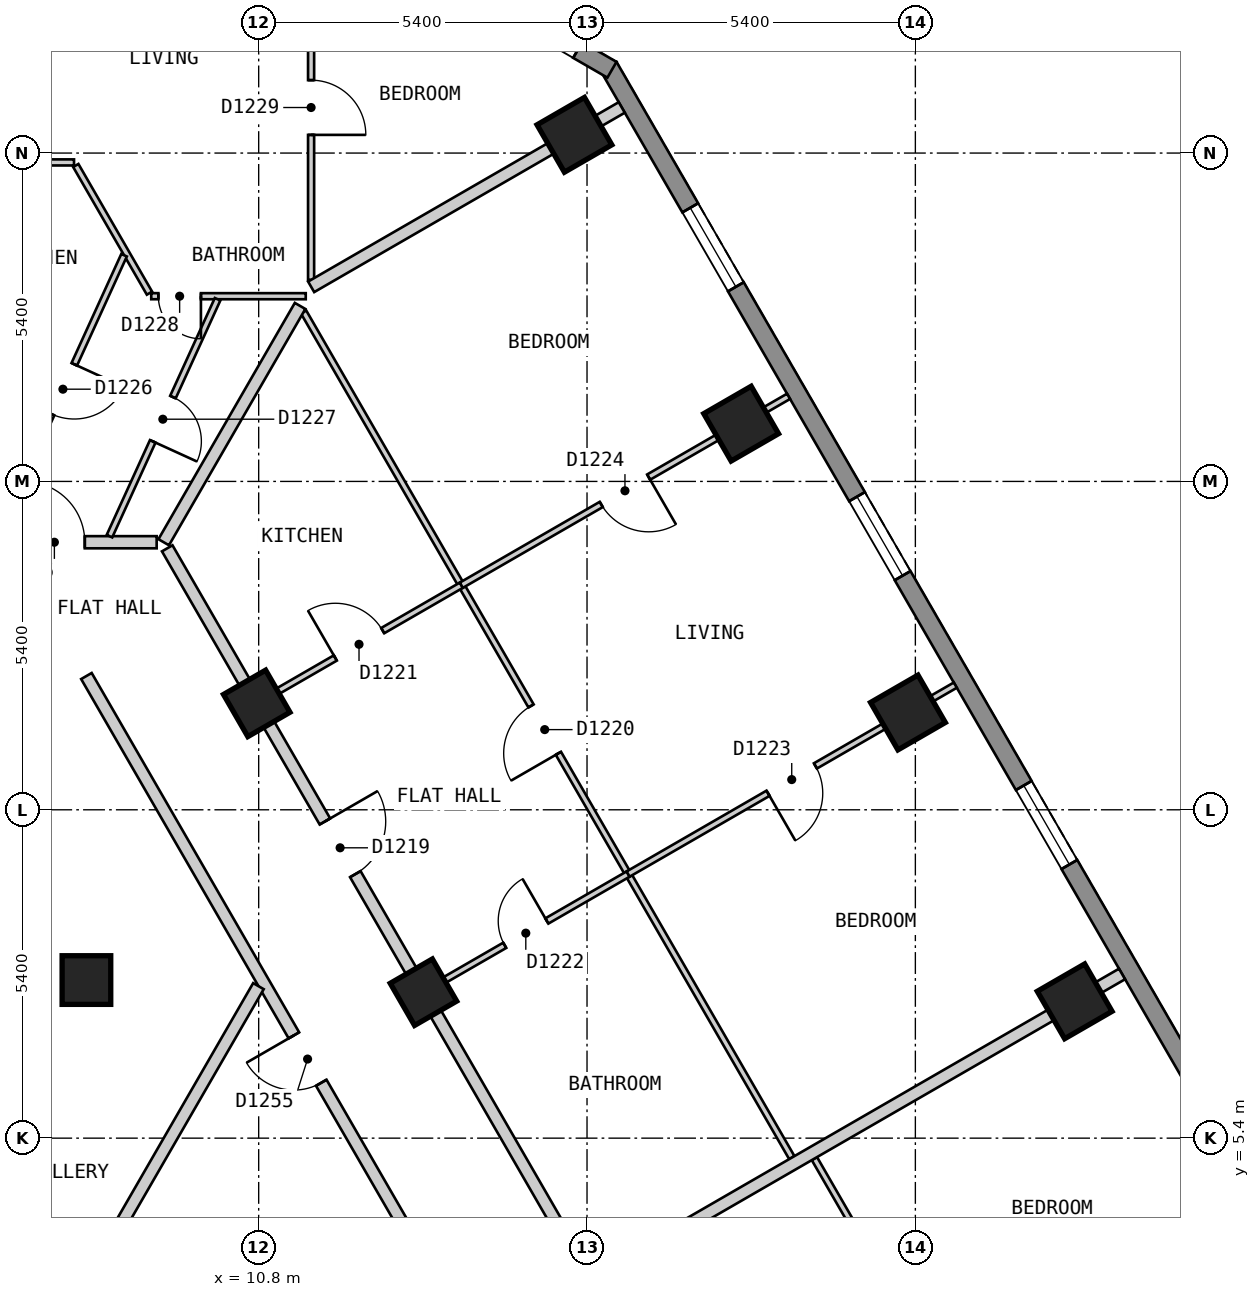
"""IFC4 building model, lengths in metres.
Left out: names, types, materials, properties, quantities, classifications, styles, units other than length and angle.
Written with IfcOpenShell. Run it as: python <this file> out.ifc"""

import sys

from ifc_helpers import new_model, si_unit, direction, frame, frame_2d, origin, origin_2d, place, context, subcontext, project, spatial, polyline, rectangle, outline, extrude, element, fill, save


model = new_model("IFC4")
c1 = context("Model", 3, precision=1e-05, world=origin(), true_north=direction((0.0, 1.0)))
c2 = subcontext(c1, "Body", "Model", "MODEL_VIEW")
j1 = project(units=[si_unit("LENGTHUNIT", "METRE"), si_unit("PLANEANGLEUNIT", "RADIAN")], contexts=[c1])
p1 = place(None, origin())
s1 = spatial("IfcSite", under=j1, at=p1, CompositionType="ELEMENT")
p2 = place(p1, origin())
s2 = spatial("IfcBuilding", under=s1, at=p2, CompositionType="ELEMENT")
p3 = place(p2, frame((0.0, 0.0, 129.6)))
s3 = spatial("IfcBuildingStorey", under=s2, at=p3, CompositionType="ELEMENT", Elevation=129.6)
for number, where, z_axis, x_axis in (
    (1, (24.22, 7.65, 0.0), (0.0, 0.0, 1.0), (-0.5, 0.866, 0.0)),
    (2, (21.478, 12.4, 0.0), (0.0, 0.0, 1.0), (-0.5, 0.866, 0.0)),
    (3, (18.735, 17.15, 0.0), (0.0, 0.0, 1.0), (-0.5, 0.866, 0.0)),
    (4, (15.993, 21.9, 0.0), (0.0, 0.0, 1.0), (-0.5, 0.866, 0.0)),
):
    element("IfcColumn", number, at=place(p3, frame(where, z_axis=z_axis, x_axis=x_axis)), inside=s3, PredefinedType="COLUMN", context=c2, shape_type="SweptSolid", body=[
        extrude(rectangle(XDim=0.9, YDim=0.9, at=origin_2d()), origin(), (0.0, 0.0, 1.0), 3.0),
    ])
for number, where, z_axis, x_axis in (
    (5, (13.51, 7.8, 0.0), (0.0, 0.0, 1.0), (-0.5, 0.866, 0.0)),
    (6, (7.967, 8.0, 0.0), (0.0, 0.0, 1.0), (1.0, 0.0, 0.0)),
    (7, (10.768, 12.55, 0.0), (0.0, 0.0, 1.0), (-0.5, 0.866, 0.0)),
):
    element("IfcColumn", number, at=place(p3, frame(where, z_axis=z_axis, x_axis=x_axis)), inside=s3, PredefinedType="COLUMN", context=c2, shape_type="SweptSolid", body=[
        extrude(rectangle(XDim=0.8, YDim=0.8, at=origin_2d()), origin(), (0.0, 0.0, 1.0), 3.0),
    ])
p4 = place(p3, frame((28.218, 2.825, 0.0), z_axis=(0.0, 0.0, 1.0), x_axis=(-0.500020536353, 0.866013546791, 0.0)))
e8 = element("IfcWall", 8, at=p4, inside=s3, PredefinedType="SOLIDWALL", context=c2, shape_type="SweptSolid", body=[
    extrude(outline(polyline([(0.0, -0.15), (23.325, -0.15), (23.245, 0.15), (0.08, 0.15), (0.0, -0.15)])), origin(), (0.0, 0.0, 1.0), 2.7),
])
p5 = place(p4, frame((2.685, 0.0, 0.15)))
e9 = element("IfcOpeningElement", 9, at=p5, cuts=e8, PredefinedType="OPENING", context=c2, shape_type="SweptSolid", body=[
    extrude(rectangle(XDim=1.5, YDim=2.1, at=frame_2d((0.75, 1.05))), frame((0.0, 0.16, 0.0), z_axis=(0.0, -1.0, 0.0), x_axis=(1.0, 0.0, 0.0)), (0.0, 0.0, 1.0), 0.32),
])
p6 = place(p4, frame((8.17, 0.0, 0.15)))
e10 = element("IfcOpeningElement", 10, at=p6, cuts=e8, PredefinedType="OPENING", context=c2, shape_type="SweptSolid", body=[
    extrude(rectangle(XDim=1.5, YDim=2.1, at=frame_2d((0.75, 1.05))), frame((0.0, 0.16, 0.0), z_axis=(0.0, -1.0, 0.0), x_axis=(1.0, 0.0, 0.0)), (0.0, 0.0, 1.0), 0.32),
])
p7 = place(p4, frame((13.655, 0.0, 0.15)))
e11 = element("IfcOpeningElement", 11, at=p7, cuts=e8, PredefinedType="OPENING", context=c2, shape_type="SweptSolid", body=[
    extrude(rectangle(XDim=1.5, YDim=2.1, at=frame_2d((0.75, 1.05))), frame((0.0, 0.16, 0.0), z_axis=(0.0, -1.0, 0.0), x_axis=(1.0, 0.0, 0.0)), (0.0, 0.0, 1.0), 0.32),
])
p8 = place(p4, frame((19.14, 0.0, 0.15)))
e12 = element("IfcOpeningElement", 12, at=p8, cuts=e8, PredefinedType="OPENING", context=c2, shape_type="SweptSolid", body=[
    extrude(rectangle(XDim=1.5, YDim=2.1, at=frame_2d((0.75, 1.05))), frame((0.0, 0.16, 0.0), z_axis=(0.0, -1.0, 0.0), x_axis=(1.0, 0.0, 0.0)), (0.0, 0.0, 1.0), 0.32),
])
p9 = place(p3, frame((16.61, 22.97, 0.0), z_axis=(0.0, 0.0, 1.0), x_axis=(-0.866022959057, 0.500004234368, 0.0)))
e13 = element("IfcWall", 13, at=p9, inside=s3, PredefinedType="SOLIDWALL", context=c2, shape_type="SweptSolid", body=[
    extrude(outline(polyline([(0.0, -0.15), (5.0, -0.15), (4.92, 0.15), (0.08, 0.15), (0.0, -0.15)])), origin(), (0.0, 0.0, 1.0), 2.7),
])
p10 = place(p9, frame((0.65, 0.0, 0.15)))
e14 = element("IfcOpeningElement", 14, at=p10, cuts=e13, PredefinedType="OPENING", context=c2, shape_type="SweptSolid", body=[
    extrude(rectangle(XDim=1.2, YDim=2.1, at=frame_2d((0.6, 1.05))), frame((0.0, 0.16, 0.0), z_axis=(0.0, -1.0, 0.0), x_axis=(1.0, 0.0, 0.0)), (0.0, 0.0, 1.0), 0.32),
])
p11 = place(p3, frame((7.967, 13.0, 0.0), z_axis=(0.0, 0.0, 1.0), x_axis=(0.50003774998, -0.866003607726, 0.0)))
e15 = element("IfcWall", 15, at=p11, inside=s3, PredefinedType="PARTITIONING", context=c2, shape_type="SweptSolid", body=[
    extrude(rectangle(XDim=14.433, YDim=0.2, at=frame_2d((7.217, 0.0))), origin(), (0.0, 0.0, 1.0), 2.7),
])
p12 = place(p11, frame((6.824, 0.0, 0.0)))
e16 = element("IfcOpeningElement", 16, at=p12, cuts=e15, PredefinedType="OPENING", context=c2, shape_type="SweptSolid", body=[
    extrude(rectangle(XDim=0.9, YDim=2.1, at=frame_2d((0.45, 1.05))), frame((0.0, 0.11, 0.0), z_axis=(0.0, -1.0, 0.0), x_axis=(1.0, 0.0, 0.0)), (0.0, 0.0, 1.0), 0.22),
])
p13 = place(p3, frame((9.296, 15.1, 0.0), z_axis=(0.0, 0.0, 1.0), x_axis=(0.499974024244, -0.866040400375, 0.0)))
e17 = element("IfcWall", 17, at=p13, inside=s3, PredefinedType="PARTITIONING", context=c2, shape_type="SweptSolid", body=[
    extrude(rectangle(XDim=16.857, YDim=0.2, at=frame_2d((8.429, 0.0))), origin(), (0.0, 0.0, 1.0), 2.7),
])
p14 = place(p13, frame((5.187, 0.0, 0.0)))
e18 = element("IfcOpeningElement", 18, at=p14, cuts=e17, PredefinedType="OPENING", context=c2, shape_type="SweptSolid", body=[
    extrude(rectangle(XDim=1.0, YDim=2.1, at=frame_2d((0.5, 1.05))), frame((0.0, 0.11, 0.0), z_axis=(0.0, -1.0, 0.0), x_axis=(1.0, 0.0, 0.0)), (0.0, 0.0, 1.0), 0.22),
])
p15 = place(p3, frame((6.697, 15.2, 0.0), z_axis=(0.0, 0.0, 1.0), x_axis=(1.0, 0.0, 0.0)))
e19 = element("IfcWall", 19, at=p15, inside=s3, PredefinedType="PARTITIONING", context=c2, shape_type="SweptSolid", body=[
    extrude(rectangle(XDim=2.425, YDim=0.2, at=frame_2d((1.212, 0.0))), origin(), (0.0, 0.0, 1.0), 2.7),
])
p16 = place(p15, frame((0.243, 0.0, 0.0)))
e20 = element("IfcOpeningElement", 20, at=p16, cuts=e19, PredefinedType="OPENING", context=c2, shape_type="SweptSolid", body=[
    extrude(rectangle(XDim=1.0, YDim=2.1, at=frame_2d((0.5, 1.05))), frame((0.0, 0.11, 0.0), z_axis=(0.0, -1.0, 0.0), x_axis=(1.0, 0.0, 0.0)), (0.0, 0.0, 1.0), 0.22),
])
p17 = place(p3, frame((7.028, 1.373, 0.0), z_axis=(0.0, 0.0, 1.0), x_axis=(0.499954271211, 0.866051803703, 0.0)))
e21 = element("IfcWall", 21, at=p17, inside=s3, PredefinedType="PARTITIONING", context=c2, shape_type="SweptSolid", body=[
    extrude(rectangle(XDim=7.536, YDim=0.2, at=frame_2d((3.768, 0.0))), origin(), (0.0, 0.0, 1.0), 2.7),
])
p18 = place(p3, frame((7.792, 21.396, 0.0), z_axis=(0.0, 0.0, 1.0), x_axis=(0.499821239653, -0.866128586522, 0.0)))
e22 = element("IfcWall", 22, at=p18, inside=s3, PredefinedType="PARTITIONING", context=c2, shape_type="SweptSolid", body=[
    extrude(rectangle(XDim=2.425, YDim=0.1, at=frame_2d((1.212, 0.0))), origin(), (0.0, 0.0, 1.0), 2.7),
])
p19 = place(p3, frame((11.539, 18.986, 0.0), z_axis=(0.0, 0.0, 1.0), x_axis=(0.500019453803, -0.866014171835, 0.0)))
e23 = element("IfcWall", 23, at=p19, inside=s3, PredefinedType="PARTITIONING", context=c2, shape_type="SweptSolid", body=[
    extrude(rectangle(XDim=16.057, YDim=0.1, at=frame_2d((8.029, 0.0))), origin(), (0.0, 0.0, 1.0), 2.7),
])
p20 = place(p19, frame((7.48, 0.0, 0.0)))
e24 = element("IfcOpeningElement", 24, at=p20, cuts=e23, PredefinedType="OPENING", context=c2, shape_type="SweptSolid", body=[
    extrude(rectangle(XDim=0.9, YDim=2.1, at=frame_2d((0.45, 1.05))), frame((0.0, 0.06, 0.0), z_axis=(0.0, -1.0, 0.0), x_axis=(1.0, 0.0, 0.0)), (0.0, 0.0, 1.0), 0.12),
])
p21 = place(p3, frame((19.94, 5.063, 0.0), z_axis=(0.0, 0.0, 1.0), x_axis=(0.500025085526, -0.866010920165, 0.0)))
e25 = element("IfcWall", 25, at=p21, inside=s3, PredefinedType="PARTITIONING", context=c2, shape_type="SweptSolid", body=[
    extrude(rectangle(XDim=5.284, YDim=0.1, at=frame_2d((2.642, 0.0))), origin(), (0.0, 0.0, 1.0), 2.7),
])
p22 = place(p21, frame((2.242, 0.0, 0.0)))
e26 = element("IfcOpeningElement", 26, at=p22, cuts=e25, PredefinedType="OPENING", context=c2, shape_type="SweptSolid", body=[
    extrude(rectangle(XDim=0.8, YDim=2.1, at=frame_2d((0.4, 1.05))), frame((0.0, 0.06, 0.0), z_axis=(0.0, -1.0, 0.0), x_axis=(1.0, 0.0, 0.0)), (0.0, 0.0, 1.0), 0.12),
])
p23 = place(p3, frame((9.033, 19.246, 0.0), z_axis=(0.0, 0.0, 1.0), x_axis=(1.0, 0.0, 0.0)))
e27 = element("IfcWall", 27, at=p23, inside=s3, PredefinedType="PARTITIONING", context=c2, shape_type="SweptSolid", body=[
    extrude(rectangle(XDim=2.541, YDim=0.1, at=frame_2d((1.271, 0.0))), origin(), (0.0, 0.0, 1.0), 2.7),
])
p24 = place(p23, frame((0.117, 0.0, 0.0)))
e28 = element("IfcOpeningElement", 28, at=p24, cuts=e27, PredefinedType="OPENING", context=c2, shape_type="SweptSolid", body=[
    extrude(rectangle(XDim=0.7, YDim=2.1, at=frame_2d((0.35, 1.05))), frame((0.0, 0.06, 0.0), z_axis=(0.0, -1.0, 0.0), x_axis=(1.0, 0.0, 0.0)), (0.0, 0.0, 1.0), 0.12),
])
p25 = place(p3, frame((5.931, 21.446, 0.0), z_axis=(0.0, 0.0, 1.0), x_axis=(1.0, 0.0, 0.0)))
e29 = element("IfcWall", 29, at=p25, inside=s3, PredefinedType="PARTITIONING", context=c2, shape_type="SweptSolid", body=[
    extrude(rectangle(XDim=1.832, YDim=0.1, at=frame_2d((0.916, 0.0))), origin(), (0.0, 0.0, 1.0), 2.7),
])
p26 = place(p3, frame((8.346, 15.3, 0.0), z_axis=(0.0, 0.0, 1.0), x_axis=(0.415189790387, 0.909734817383, 0.0)))
e30 = element("IfcWall", 30, at=p26, inside=s3, PredefinedType="PARTITIONING", context=c2, shape_type="SweptSolid", body=[
    extrude(rectangle(XDim=4.282, YDim=0.1, at=frame_2d((2.141, 0.0))), origin(), (0.0, 0.0, 1.0), 2.7),
])
p27 = place(p26, frame((1.714, 0.0, 0.0)))
e31 = element("IfcOpeningElement", 31, at=p27, cuts=e30, PredefinedType="OPENING", context=c2, shape_type="SweptSolid", body=[
    extrude(rectangle(XDim=0.8, YDim=2.1, at=frame_2d((0.4, 1.05))), frame((0.0, 0.06, 0.0), z_axis=(0.0, -1.0, 0.0), x_axis=(1.0, 0.0, 0.0)), (0.0, 0.0, 1.0), 0.12),
])
p28 = place(p3, frame((6.6, 15.569, 0.0), z_axis=(0.0, 0.0, 1.0), x_axis=(0.415221636251, 0.909720282718, 0.0)))
e32 = element("IfcWall", 32, at=p28, inside=s3, PredefinedType="PARTITIONING", context=c2, shape_type="SweptSolid", body=[
    extrude(rectangle(XDim=4.783, YDim=0.1, at=frame_2d((2.391, 0.0))), origin(), (0.0, 0.0, 1.0), 2.7),
])
p29 = place(p28, frame((1.911, 0.0, 0.0)))
e33 = element("IfcOpeningElement", 33, at=p29, cuts=e32, PredefinedType="OPENING", context=c2, shape_type="SweptSolid", body=[
    extrude(rectangle(XDim=0.9, YDim=2.1, at=frame_2d((0.45, 1.05))), frame((0.0, 0.06, 0.0), z_axis=(0.0, -1.0, 0.0), x_axis=(1.0, 0.0, 0.0)), (0.0, 0.0, 1.0), 0.12),
])
p30 = place(p3, frame((11.662, 19.514, 0.0), z_axis=(0.0, 0.0, 1.0), x_axis=(0.0, 1.0, 0.0)))
e34 = element("IfcWall", 34, at=p30, inside=s3, PredefinedType="PARTITIONING", context=c2, shape_type="SweptSolid", body=[
    extrude(rectangle(XDim=5.786, YDim=0.1, at=frame_2d((2.893, 0.0))), origin(), (0.0, 0.0, 1.0), 2.7),
])
p31 = place(p30, frame((2.385, 0.0, 0.0)))
e35 = element("IfcOpeningElement", 35, at=p31, cuts=e34, PredefinedType="OPENING", context=c2, shape_type="SweptSolid", body=[
    extrude(rectangle(XDim=0.9, YDim=2.1, at=frame_2d((0.45, 1.05))), frame((0.0, 0.06, 0.0), z_axis=(0.0, -1.0, 0.0), x_axis=(1.0, 0.0, 0.0)), (0.0, 0.0, 1.0), 0.12),
])
p32 = place(p3, frame((13.597, 7.85, 0.0), z_axis=(0.0, 0.0, 1.0), x_axis=(0.8660642533, 0.499932704626, 0.0)))
e36 = element("IfcWall", 36, at=p32, inside=s3, PredefinedType="PARTITIONING", context=c2, shape_type="SweptSolid", body=[
    extrude(rectangle(XDim=3.786, YDim=0.1, at=frame_2d((1.893, 0.0))), origin(), (0.0, 0.0, 1.0), 2.7),
])
p33 = place(p32, frame((1.443, 0.0, 0.0)))
e37 = element("IfcOpeningElement", 37, at=p33, cuts=e36, PredefinedType="OPENING", context=c2, shape_type="SweptSolid", body=[
    extrude(rectangle(XDim=0.8, YDim=2.1, at=frame_2d((0.4, 1.05))), frame((0.0, 0.06, 0.0), z_axis=(0.0, -1.0, 0.0), x_axis=(1.0, 0.0, 0.0)), (0.0, 0.0, 1.0), 0.12),
])
p34 = place(p3, frame((10.854, 12.6, 0.0), z_axis=(0.0, 0.0, 1.0), x_axis=(0.8660642533, 0.499932704626, 0.0)))
e38 = element("IfcWall", 38, at=p34, inside=s3, PredefinedType="PARTITIONING", context=c2, shape_type="SweptSolid", body=[
    extrude(rectangle(XDim=3.786, YDim=0.1, at=frame_2d((1.893, 0.0))), origin(), (0.0, 0.0, 1.0), 2.7),
])
p35 = place(p34, frame((1.393, 0.0, 0.0)))
e39 = element("IfcOpeningElement", 39, at=p35, cuts=e38, PredefinedType="OPENING", context=c2, shape_type="SweptSolid", body=[
    extrude(rectangle(XDim=0.9, YDim=2.1, at=frame_2d((0.45, 1.05))), frame((0.0, 0.06, 0.0), z_axis=(0.0, -1.0, 0.0), x_axis=(1.0, 0.0, 0.0)), (0.0, 0.0, 1.0), 0.12),
])
p36 = place(p3, frame((9.238, 15.2, 0.0), z_axis=(0.0, 0.0, 1.0), x_axis=(0.499890453443, 0.866088641281, 0.0)))
e40 = element("IfcWall", 40, at=p36, inside=s3, PredefinedType="PARTITIONING", context=c2, shape_type="SweptSolid", body=[
    extrude(rectangle(XDim=4.487, YDim=0.2, at=frame_2d((2.243, 0.0))), origin(), (0.0, 0.0, 1.0), 2.7),
])
p37 = place(p3, frame((16.339, 3.1, 0.0), z_axis=(0.0, 0.0, 1.0), x_axis=(0.866016855193, 0.500014806302, 0.0)))
e41 = element("IfcWall", 41, at=p37, inside=s3, PredefinedType="PARTITIONING", context=c2, shape_type="SweptSolid", body=[
    extrude(rectangle(XDim=10.0, YDim=0.2, at=frame_2d((5.0, 0.0))), origin(), (0.0, 0.0, 1.0), 2.7),
])
p38 = place(p3, frame((11.663, 19.4, 0.0), z_axis=(0.0, 0.0, 1.0), x_axis=(0.865941558533, 0.500145196124, 0.0)))
e42 = element("IfcWall", 42, at=p38, inside=s3, PredefinedType="PARTITIONING", context=c2, shape_type="SweptSolid", body=[
    extrude(rectangle(XDim=5.899, YDim=0.2, at=frame_2d((2.949, 0.0))), origin(), (0.0, 0.0, 1.0), 2.7),
])
p39 = place(p3, frame((16.876, 9.743, 0.0), z_axis=(0.0, 0.0, 1.0), x_axis=(0.865997794851, 0.500047817026, 0.0)))
e43 = element("IfcWall", 43, at=p39, inside=s3, PredefinedType="PARTITIONING", context=c2, shape_type="SweptSolid", body=[
    extrude(rectangle(XDim=6.214, YDim=0.1, at=frame_2d((3.107, 0.0))), origin(), (0.0, 0.0, 1.0), 2.7),
])
p40 = place(p39, frame((2.657, 0.0, 0.0)))
e44 = element("IfcOpeningElement", 44, at=p40, cuts=e43, PredefinedType="OPENING", context=c2, shape_type="SweptSolid", body=[
    extrude(rectangle(XDim=0.9, YDim=2.1, at=frame_2d((0.45, 1.05))), frame((0.0, 0.06, 0.0), z_axis=(0.0, -1.0, 0.0), x_axis=(1.0, 0.0, 0.0)), (0.0, 0.0, 1.0), 0.12),
])
p41 = place(p3, frame((14.133, 14.493, 0.0), z_axis=(0.0, 0.0, 1.0), x_axis=(0.866056028236, 0.499946953142, 0.0)))
e45 = element("IfcWall", 45, at=p41, inside=s3, PredefinedType="PARTITIONING", context=c2, shape_type="SweptSolid", body=[
    extrude(rectangle(XDim=6.213, YDim=0.1, at=frame_2d((3.106, 0.0))), origin(), (0.0, 0.0, 1.0), 2.7),
])
p42 = place(p41, frame((2.657, 0.0, 0.0)))
e46 = element("IfcOpeningElement", 46, at=p42, cuts=e45, PredefinedType="OPENING", context=c2, shape_type="SweptSolid", body=[
    extrude(rectangle(XDim=0.9, YDim=2.1, at=frame_2d((0.45, 1.05))), frame((0.0, 0.06, 0.0), z_axis=(0.0, -1.0, 0.0), x_axis=(1.0, 0.0, 0.0)), (0.0, 0.0, 1.0), 0.12),
])
p43 = place(p6, origin())
e47 = element("IfcWindow", 47, at=p43, inside=s3, PartitioningType="SINGLE_PANEL", PredefinedType="WINDOW", context=c2, shape_type="SweptSolid", body=[
    extrude(rectangle(XDim=1.5, YDim=2.1, at=frame_2d((0.75, 1.05))), frame((0.0, 0.03, 0.0), z_axis=(0.0, -1.0, 0.0), x_axis=(1.0, 0.0, 0.0)), (0.0, 0.0, 1.0), 0.06),
])
fill(e10, e47)
p44 = place(p7, origin())
e48 = element("IfcWindow", 48, at=p44, inside=s3, PartitioningType="SINGLE_PANEL", PredefinedType="WINDOW", context=c2, shape_type="SweptSolid", body=[
    extrude(rectangle(XDim=1.5, YDim=2.1, at=frame_2d((0.75, 1.05))), frame((0.0, 0.03, 0.0), z_axis=(0.0, -1.0, 0.0), x_axis=(1.0, 0.0, 0.0)), (0.0, 0.0, 1.0), 0.06),
])
fill(e11, e48)
p45 = place(p8, origin())
e49 = element("IfcWindow", 49, at=p45, inside=s3, PartitioningType="SINGLE_PANEL", PredefinedType="WINDOW", context=c2, shape_type="SweptSolid", body=[
    extrude(rectangle(XDim=1.5, YDim=2.1, at=frame_2d((0.75, 1.05))), frame((0.0, 0.03, 0.0), z_axis=(0.0, -1.0, 0.0), x_axis=(1.0, 0.0, 0.0)), (0.0, 0.0, 1.0), 0.06),
])
fill(e12, e49)
p46 = place(p14, origin())
e50 = element("IfcDoor", 50, at=p46, inside=s3, OperationType="SINGLE_SWING_LEFT", PredefinedType="DOOR", context=c2, shape_type="SweptSolid", body=[
    extrude(rectangle(XDim=1.0, YDim=2.1, at=frame_2d((0.5, 1.05))), frame((0.0, 0.025, 0.0), z_axis=(0.0, -1.0, 0.0), x_axis=(1.0, 0.0, 0.0)), (0.0, 0.0, 1.0), 0.05),
])
fill(e18, e50)
p47 = place(p20, origin())
e51 = element("IfcDoor", 51, at=p47, inside=s3, OperationType="SINGLE_SWING_RIGHT", PredefinedType="DOOR", context=c2, shape_type="SweptSolid", body=[
    extrude(rectangle(XDim=0.9, YDim=2.1, at=frame_2d((0.45, 1.05))), frame((0.0, 0.025, 0.0), z_axis=(0.0, -1.0, 0.0), x_axis=(1.0, 0.0, 0.0)), (0.0, 0.0, 1.0), 0.05),
])
fill(e24, e51)
p48 = place(p35, origin())
e52 = element("IfcDoor", 52, at=p48, inside=s3, OperationType="SINGLE_SWING_LEFT", PredefinedType="DOOR", context=c2, shape_type="SweptSolid", body=[
    extrude(rectangle(XDim=0.9, YDim=2.1, at=frame_2d((0.45, 1.05))), frame((0.0, 0.025, 0.0), z_axis=(0.0, -1.0, 0.0), x_axis=(1.0, 0.0, 0.0)), (0.0, 0.0, 1.0), 0.05),
])
fill(e39, e52)
p49 = place(p33, origin())
e53 = element("IfcDoor", 53, at=p49, inside=s3, OperationType="SINGLE_SWING_RIGHT", PredefinedType="DOOR", context=c2, shape_type="SweptSolid", body=[
    extrude(rectangle(XDim=0.8, YDim=2.1, at=frame_2d((0.4, 1.05))), frame((0.0, 0.025, 0.0), z_axis=(0.0, -1.0, 0.0), x_axis=(1.0, 0.0, 0.0)), (0.0, 0.0, 1.0), 0.05),
])
fill(e37, e53)
p50 = place(p40, origin())
e54 = element("IfcDoor", 54, at=p50, inside=s3, OperationType="SINGLE_SWING_LEFT", PredefinedType="DOOR", context=c2, shape_type="SweptSolid", body=[
    extrude(rectangle(XDim=0.9, YDim=2.1, at=frame_2d((0.45, 1.05))), frame((0.0, 0.025, 0.0), z_axis=(0.0, -1.0, 0.0), x_axis=(1.0, 0.0, 0.0)), (0.0, 0.0, 1.0), 0.05),
])
fill(e44, e54)
p51 = place(p42, origin())
e55 = element("IfcDoor", 55, at=p51, inside=s3, OperationType="SINGLE_SWING_RIGHT", PredefinedType="DOOR", context=c2, shape_type="SweptSolid", body=[
    extrude(rectangle(XDim=0.9, YDim=2.1, at=frame_2d((0.45, 1.05))), frame((0.0, 0.025, 0.0), z_axis=(0.0, -1.0, 0.0), x_axis=(1.0, 0.0, 0.0)), (0.0, 0.0, 1.0), 0.05),
])
fill(e46, e55)
p52 = place(p16, origin())
e56 = element("IfcDoor", 56, at=p52, inside=s3, OperationType="SINGLE_SWING_LEFT", PredefinedType="DOOR", context=c2, shape_type="SweptSolid", body=[
    extrude(rectangle(XDim=1.0, YDim=2.1, at=frame_2d((0.5, 1.05))), frame((0.0, 0.025, 0.0), z_axis=(0.0, -1.0, 0.0), x_axis=(1.0, 0.0, 0.0)), (0.0, 0.0, 1.0), 0.05),
])
fill(e20, e56)
p53 = place(p29, origin())
e57 = element("IfcDoor", 57, at=p53, inside=s3, OperationType="SINGLE_SWING_RIGHT", PredefinedType="DOOR", context=c2, shape_type="SweptSolid", body=[
    extrude(rectangle(XDim=0.9, YDim=2.1, at=frame_2d((0.45, 1.05))), frame((0.0, 0.025, 0.0), z_axis=(0.0, -1.0, 0.0), x_axis=(1.0, 0.0, 0.0)), (0.0, 0.0, 1.0), 0.05),
])
fill(e33, e57)
p54 = place(p27, origin())
e58 = element("IfcDoor", 58, at=p54, inside=s3, OperationType="SINGLE_SWING_LEFT", PredefinedType="DOOR", context=c2, shape_type="SweptSolid", body=[
    extrude(rectangle(XDim=0.8, YDim=2.1, at=frame_2d((0.4, 1.05))), frame((0.0, 0.025, 0.0), z_axis=(0.0, -1.0, 0.0), x_axis=(1.0, 0.0, 0.0)), (0.0, 0.0, 1.0), 0.05),
])
fill(e31, e58)
p55 = place(p24, origin())
e59 = element("IfcDoor", 59, at=p55, inside=s3, OperationType="SINGLE_SWING_RIGHT", PredefinedType="DOOR", context=c2, shape_type="SweptSolid", body=[
    extrude(rectangle(XDim=0.7, YDim=2.1, at=frame_2d((0.35, 1.05))), frame((0.0, 0.025, 0.0), z_axis=(0.0, -1.0, 0.0), x_axis=(1.0, 0.0, 0.0)), (0.0, 0.0, 1.0), 0.05),
])
fill(e28, e59)
p56 = place(p31, origin())
e60 = element("IfcDoor", 60, at=p56, inside=s3, OperationType="SINGLE_SWING_LEFT", PredefinedType="DOOR", context=c2, shape_type="SweptSolid", body=[
    extrude(rectangle(XDim=0.9, YDim=2.1, at=frame_2d((0.45, 1.05))), frame((0.0, 0.025, 0.0), z_axis=(0.0, -1.0, 0.0), x_axis=(1.0, 0.0, 0.0)), (0.0, 0.0, 1.0), 0.05),
])
fill(e35, e60)
p57 = place(p12, origin())
e61 = element("IfcDoor", 61, at=p57, inside=s3, OperationType="SINGLE_SWING_LEFT", PredefinedType="DOOR", context=c2, shape_type="SweptSolid", body=[
    extrude(rectangle(XDim=0.9, YDim=2.1, at=frame_2d((0.45, 1.05))), frame((0.0, 0.025, 0.0), z_axis=(0.0, -1.0, 0.0), x_axis=(1.0, 0.0, 0.0)), (0.0, 0.0, 1.0), 0.05),
])
fill(e16, e61)
save(model, sys.argv[1])
